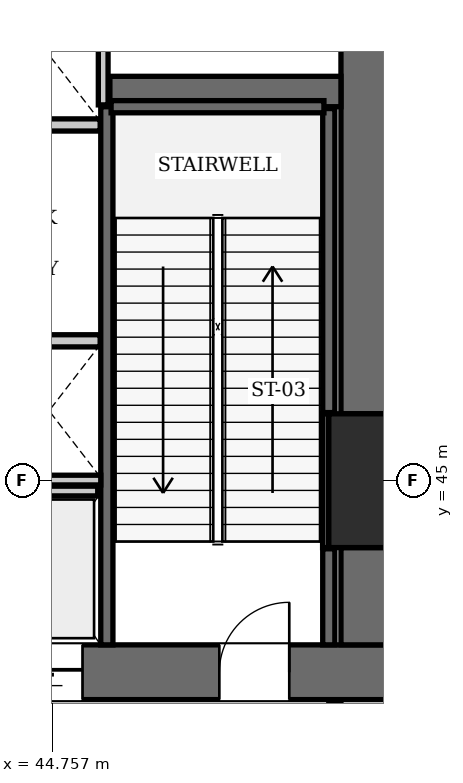
"""IFC4 building model, lengths in metres.
Left out: names, types, materials, properties, quantities, classifications, styles, units other than length and angle.
Written with IfcOpenShell. Run it as: python <this file> out.ifc"""

import sys

from ifc_helpers import new_model, si_unit, direction, frame, frame_2d, origin, origin_2d, place, context, subcontext, project, spatial, rectangle, extrude, element, fill, save


model = new_model("IFC4")
c1 = context("Model", 3, precision=1e-05, world=origin(), true_north=direction((0.0, 1.0)))
c2 = subcontext(c1, "Body", "Model", "MODEL_VIEW")
j1 = project(units=[si_unit("LENGTHUNIT", "METRE"), si_unit("PLANEANGLEUNIT", "RADIAN")], contexts=[c1])
p1 = place(None, origin())
s1 = spatial("IfcSite", under=j1, at=p1, CompositionType="ELEMENT")
p2 = place(p1, origin())
s2 = spatial("IfcBuilding", under=s1, at=p2, CompositionType="ELEMENT")
p3 = place(p2, frame((0.0, 0.0, 115.5)))
s3 = spatial("IfcBuildingStorey", under=s2, at=p3, CompositionType="ELEMENT", Elevation=115.5)
p4 = place(p3, frame((50.4, 45.0, 0.0), z_axis=(0.0, 0.0, 1.0), x_axis=(1.0, 0.0, 0.0)))
e1 = element("IfcColumn", 1, at=p4, inside=s3, PredefinedType="COLUMN", context=c2, shape_type="SweptSolid", body=[
    extrude(rectangle(XDim=2.2, YDim=2.2, at=origin_2d()), origin(), (0.0, 0.0, 1.0), 7.0),
])
p5 = place(p3, frame((43.6, 41.85, 0.0), z_axis=(0.0, 0.0, 1.0), x_axis=(1.0, 0.0, 0.0)))
e2 = element("IfcWall", 2, at=p5, inside=s3, PredefinedType="SHEAR", context=c2, shape_type="SweptSolid", body=[
    extrude(rectangle(XDim=6.8, YDim=0.9, at=frame_2d((3.4, 0.0))), origin(), (0.0, 0.0, 1.0), 7.0),
])
p6 = place(p5, frame((3.9, 0.0, 0.0)))
e3 = element("IfcOpeningElement", 3, at=p6, cuts=e2, PredefinedType="OPENING", context=c2, shape_type="SweptSolid", body=[
    extrude(rectangle(XDim=1.15, YDim=2.15, at=frame_2d((0.575, 1.075))), frame((0.0, 0.46, 0.0), z_axis=(0.0, -1.0, 0.0), x_axis=(1.0, 0.0, 0.0)), (0.0, 0.0, 1.0), 0.92),
])
p7 = place(p5, frame((0.55, 0.0, 0.0)))
e4 = element("IfcOpeningElement", 4, at=p7, cuts=e2, PredefinedType="OPENING", context=c2, shape_type="SweptSolid", body=[
    extrude(rectangle(XDim=1.1, YDim=2.2, at=frame_2d((0.55, 1.1))), frame((0.0, 0.46, 0.0), z_axis=(0.0, -1.0, 0.0), x_axis=(1.0, 0.0, 0.0)), (0.0, 0.0, 1.0), 0.92),
])
p8 = place(p3, frame((49.95, 42.3, 0.0), z_axis=(0.0, 0.0, 1.0), x_axis=(0.0, 1.0, 0.0)))
e5 = element("IfcWall", 5, at=p8, inside=s3, PredefinedType="SHEAR", context=c2, shape_type="SweptSolid", body=[
    extrude(rectangle(XDim=1.6, YDim=0.9, at=frame_2d((0.8, 0.0))), origin(), (0.0, 0.0, 1.0), 7.0),
])
p9 = place(p3, frame((49.95, 46.1, 0.0), z_axis=(0.0, 0.0, 1.0), x_axis=(0.0, 1.0, 0.0)))
e6 = element("IfcWall", 6, at=p9, inside=s3, PredefinedType="SHEAR", context=c2, shape_type="SweptSolid", body=[
    extrude(rectangle(XDim=7.0, YDim=0.9, at=frame_2d((3.5, 0.0))), origin(), (0.0, 0.0, 1.0), 7.0),
])
p10 = place(p3, frame((45.7, 51.4, 0.0), z_axis=(0.0, 0.0, 1.0), x_axis=(1.0, 0.0, 0.0)))
e7 = element("IfcWall", 7, at=p10, inside=s3, PredefinedType="SHEAR", context=c2, shape_type="SweptSolid", body=[
    extrude(rectangle(XDim=3.8, YDim=0.5, at=frame_2d((1.9, 0.0))), origin(), (0.0, 0.0, 1.0), 7.0),
])
p11 = place(p3, frame((45.65, 42.3, 0.0), z_axis=(0.0, 0.0, 1.0), x_axis=(0.0, 1.0, 0.0)))
e8 = element("IfcWall", 8, at=p11, inside=s3, PredefinedType="SOLIDWALL", context=c2, shape_type="SweptSolid", body=[
    extrude(rectangle(XDim=8.85, YDim=0.2, at=frame_2d((4.425, 0.0))), origin(), (0.0, 0.0, 1.0), 6.76),
])
p12 = place(p3, frame((49.3, 42.3, 0.0), z_axis=(0.0, 0.0, 1.0), x_axis=(0.0, 1.0, 0.0)))
e9 = element("IfcWall", 9, at=p12, inside=s3, PredefinedType="SOLIDWALL", context=c2, shape_type="SweptSolid", body=[
    extrude(rectangle(XDim=1.58, YDim=0.2, at=frame_2d((0.79, 0.0))), origin(), (0.0, 0.0, 1.0), 6.76),
])
p13 = place(p3, frame((49.3, 46.12, 0.0), z_axis=(0.0, 0.0, 1.0), x_axis=(0.0, 1.0, 0.0)))
e10 = element("IfcWall", 10, at=p13, inside=s3, PredefinedType="SOLIDWALL", context=c2, shape_type="SweptSolid", body=[
    extrude(rectangle(XDim=5.0, YDim=0.2, at=frame_2d((2.5, 0.0))), origin(), (0.0, 0.0, 1.0), 6.76),
])
p14 = place(p3, frame((45.72, 51.15, 0.0), z_axis=(0.0, 0.0, 1.0), x_axis=(1.0, 0.0, 0.0)))
e11 = element("IfcWall", 11, at=p14, inside=s3, PredefinedType="SOLIDWALL", context=c2, shape_type="SweptSolid", body=[
    extrude(rectangle(XDim=3.5, YDim=0.2, at=frame_2d((1.75, 0.0))), origin(), (0.0, 0.0, 1.0), 6.76),
])
p15 = place(p3, frame((49.248, 43.9, 0.0), z_axis=(0.0, 0.0, 1.0), x_axis=(0.0, 1.0, 0.0)))
e12 = element("IfcWall", 12, at=p15, inside=s3, PredefinedType="SOLIDWALL", context=c2, shape_type="SweptSolid", body=[
    extrude(rectangle(XDim=2.2, YDim=0.1, at=frame_2d((1.1, 0.0))), origin(), (0.0, 0.0, 1.0), 6.76),
])
for number, where, z_axis, x_axis in (
    (13, (43.86, 47.3, 0.0), (0.0, 0.0, 1.0), (1.0, 0.0, 0.0)),
    (14, (43.86, 50.85, 0.0), (0.0, 0.0, 1.0), (1.0, 0.0, 0.0)),
):
    element("IfcWall", number, at=place(p3, frame(where, z_axis=z_axis, x_axis=x_axis)), inside=s3, PredefinedType="SOLIDWALL", context=c2, shape_type="SweptSolid", body=[
        extrude(rectangle(XDim=1.68, YDim=0.2, at=frame_2d((0.84, 0.0))), origin(), (0.0, 0.0, 1.0), 6.76),
    ])
p16 = place(p3, frame((43.9, 44.83, 0.0), z_axis=(0.0, 0.0, 1.0), x_axis=(1.0, 0.0, 0.0)))
e15 = element("IfcWall", 15, at=p16, inside=s3, PredefinedType="SOLIDWALL", context=c2, shape_type="SweptSolid", body=[
    extrude(rectangle(XDim=1.6, YDim=0.16, at=frame_2d((0.8, 0.0))), origin(), (0.0, 0.0, 1.0), 6.76),
])
p17 = place(p3, frame((42.1, 45.01, 0.0), z_axis=(0.0, 0.0, 1.0), x_axis=(1.0, 0.0, 0.0)))
e16 = element("IfcWall", 16, at=p17, inside=s3, PredefinedType="SOLIDWALL", context=c2, shape_type="SweptSolid", body=[
    extrude(rectangle(XDim=3.45, YDim=0.16, at=frame_2d((1.725, 0.0))), origin(), (0.0, 0.0, 1.0), 6.76),
])
p18 = place(p3, frame((45.59, 51.18, 0.0), z_axis=(0.0, 0.0, 1.0), x_axis=(0.0, 1.0, 0.0)))
e17 = element("IfcWall", 17, at=p18, inside=s3, PredefinedType="SOLIDWALL", context=c2, shape_type="SweptSolid", body=[
    extrude(rectangle(XDim=1.92, YDim=0.16, at=frame_2d((0.96, 0.0))), origin(), (0.0, 0.0, 1.0), 6.76),
])
p19 = place(p3, frame((49.4, 38.31, 0.0), z_axis=(0.0, 0.0, 1.0), x_axis=(0.0, 1.0, 0.0)))
e18 = element("IfcWall", 18, at=p19, inside=s3, PredefinedType="PARTITIONING", context=c2, shape_type="SweptSolid", body=[
    extrude(rectangle(XDim=3.07, YDim=0.2, at=frame_2d((1.535, 0.0))), origin(), (0.0, 0.0, 1.0), 6.76),
])
p20 = place(p6, origin())
e19 = element("IfcDoor", 19, at=p20, inside=s3, OperationType="SINGLE_SWING_RIGHT", PredefinedType="DOOR", context=c2, shape_type="SweptSolid", body=[
    extrude(rectangle(XDim=1.15, YDim=2.15, at=frame_2d((0.575, 1.075))), frame((0.0, 0.025, 0.0), z_axis=(0.0, -1.0, 0.0), x_axis=(1.0, 0.0, 0.0)), (0.0, 0.0, 1.0), 0.05),
])
fill(e3, e19)
p21 = place(p7, frame((1.1, 0.0, 0.0), z_axis=(0.0, 0.0, 1.0), x_axis=(-1.0, 0.0, 0.0)))
e20 = element("IfcDoor", 20, at=p21, inside=s3, OperationType="SLIDING_TO_LEFT", PredefinedType="DOOR", context=c2, shape_type="SweptSolid", body=[
    extrude(rectangle(XDim=1.1, YDim=2.2, at=frame_2d((0.55, 1.1))), frame((0.0, 0.025, 0.0), z_axis=(0.0, -1.0, 0.0), x_axis=(1.0, 0.0, 0.0)), (0.0, 0.0, 1.0), 0.05),
])
fill(e4, e20)
save(model, sys.argv[1])
